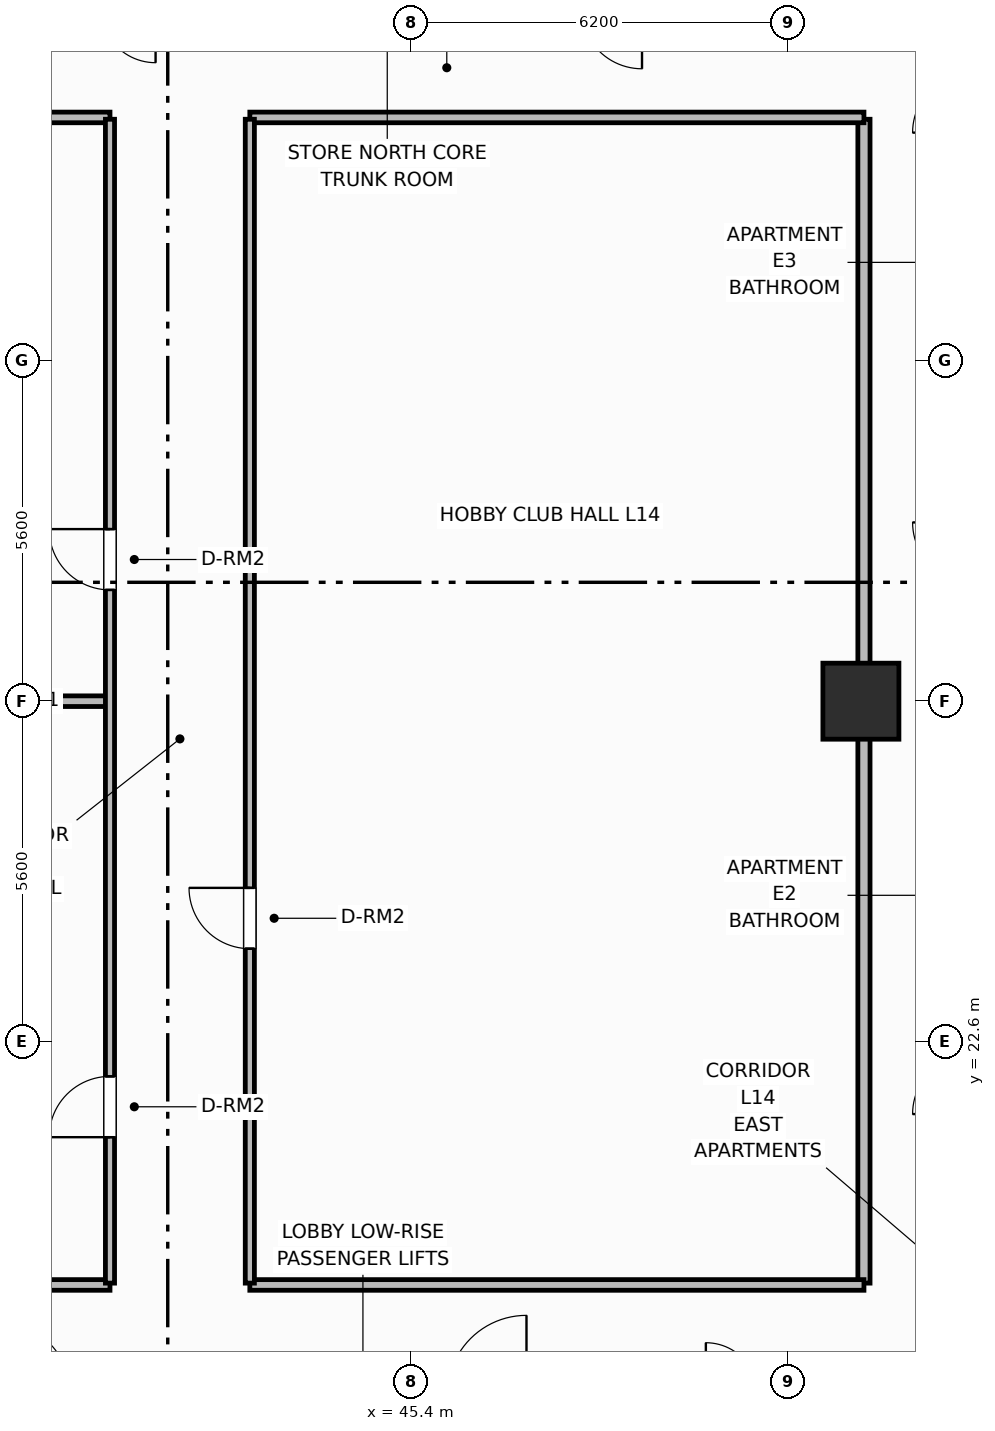
"""IFC4 building model, lengths in metres.
Left out: names, types, materials, properties, quantities, classifications, styles, units other than length and angle.
Written with IfcOpenShell. Run it as: python <this file> out.ifc"""

import sys

from ifc_helpers import new_model, si_unit, direction, frame, frame_2d, origin, origin_2d, place, context, subcontext, project, spatial, rectangle, extrude, element, fill, save


model = new_model("IFC4")
c1 = context("Model", 3, precision=1e-05, world=origin(), true_north=direction((0.0, 1.0)))
c2 = subcontext(c1, "Body", "Model", "MODEL_VIEW")
j1 = project(units=[si_unit("LENGTHUNIT", "METRE"), si_unit("PLANEANGLEUNIT", "RADIAN")], contexts=[c1])
p1 = place(None, origin())
s1 = spatial("IfcSite", under=j1, at=p1, CompositionType="ELEMENT")
p2 = place(p1, origin())
s2 = spatial("IfcBuilding", under=s1, at=p2, CompositionType="ELEMENT")
p3 = place(p2, frame((0.0, 0.0, 58.4)))
s3 = spatial("IfcBuildingStorey", under=s2, at=p3, CompositionType="ELEMENT", Elevation=58.4)
p4 = place(p3, frame((52.8, 28.2, 0.0), z_axis=(0.0, 0.0, 1.0), x_axis=(1.0, 0.0, 0.0)))
e1 = element("IfcColumn", 1, at=p4, inside=s3, PredefinedType="COLUMN", context=c2, shape_type="SweptSolid", body=[
    extrude(rectangle(XDim=1.25, YDim=1.25, at=origin_2d()), origin(), (0.0, 0.0, 1.0), 3.7),
])
p5 = place(p3, frame((52.85, 18.63, 0.0), z_axis=(0.0, 0.0, 1.0), x_axis=(0.0, 1.0, 0.0)))
e2 = element("IfcWall", 2, at=p5, inside=s3, PredefinedType="PARTITIONING", context=c2, shape_type="SweptSolid", body=[
    extrude(rectangle(XDim=19.14, YDim=0.2, at=frame_2d((9.57, 0.0))), origin(), (0.0, 0.0, 1.0), 2.53),
])
p6 = place(p3, frame((25.55, 18.6, 0.0), z_axis=(0.0, 0.0, 1.0), x_axis=(1.0, 0.0, 0.0)))
e3 = element("IfcWall", 3, at=p6, inside=s3, PredefinedType="PARTITIONING", context=c2, shape_type="SweptSolid", body=[
    extrude(rectangle(XDim=14.9, YDim=0.175, at=frame_2d((7.45, 0.0))), origin(), (0.0, 0.0, 1.0), 2.53),
])
p7 = place(p3, frame((42.75, 18.6, 0.0), z_axis=(0.0, 0.0, 1.0), x_axis=(1.0, 0.0, 0.0)))
e4 = element("IfcWall", 4, at=p7, inside=s3, PredefinedType="PARTITIONING", context=c2, shape_type="SweptSolid", body=[
    extrude(rectangle(XDim=10.1, YDim=0.175, at=frame_2d((5.05, 0.0))), origin(), (0.0, 0.0, 1.0), 2.53),
])
p8 = place(p3, frame((25.55, 37.8, 0.0), z_axis=(0.0, 0.0, 1.0), x_axis=(1.0, 0.0, 0.0)))
e5 = element("IfcWall", 5, at=p8, inside=s3, PredefinedType="PARTITIONING", context=c2, shape_type="SweptSolid", body=[
    extrude(rectangle(XDim=14.9, YDim=0.175, at=frame_2d((7.45, 0.0))), origin(), (0.0, 0.0, 1.0), 2.53),
])
p9 = place(p3, frame((42.75, 37.8, 0.0), z_axis=(0.0, 0.0, 1.0), x_axis=(1.0, 0.0, 0.0)))
e6 = element("IfcWall", 6, at=p9, inside=s3, PredefinedType="PARTITIONING", context=c2, shape_type="SweptSolid", body=[
    extrude(rectangle(XDim=10.1, YDim=0.175, at=frame_2d((5.05, 0.0))), origin(), (0.0, 0.0, 1.0), 2.53),
])
p10 = place(p3, frame((25.6, 28.2, 0.0), z_axis=(0.0, 0.0, 1.0), x_axis=(1.0, 0.0, 0.0)))
e7 = element("IfcWall", 7, at=p10, inside=s3, PredefinedType="PARTITIONING", context=c2, shape_type="SweptSolid", body=[
    extrude(rectangle(XDim=14.87, YDim=0.175, at=frame_2d((7.435, 0.0))), origin(), (0.0, 0.0, 1.0), 2.53),
])
p11 = place(p3, frame((40.45, 18.63, 0.0), z_axis=(0.0, 0.0, 1.0), x_axis=(0.0, 1.0, 0.0)))
e8 = element("IfcWall", 8, at=p11, inside=s3, PredefinedType="PARTITIONING", context=c2, shape_type="SweptSolid", body=[
    extrude(rectangle(XDim=19.14, YDim=0.15, at=frame_2d((9.57, 0.0))), origin(), (0.0, 0.0, 1.0), 2.53),
])
p12 = place(p11, frame((2.4, 0.0, 0.0)))
e9 = element("IfcOpeningElement", 9, at=p12, cuts=e8, PredefinedType="OPENING", context=c2, shape_type="SweptSolid", body=[
    extrude(rectangle(XDim=1.0, YDim=2.15, at=frame_2d((0.5, 1.075))), frame((0.0, 0.085, 0.0), z_axis=(0.0, -1.0, 0.0), x_axis=(1.0, 0.0, 0.0)), (0.0, 0.0, 1.0), 0.17),
])
p13 = place(p11, frame((11.4, 0.0, 0.0)))
e10 = element("IfcOpeningElement", 10, at=p13, cuts=e8, PredefinedType="OPENING", context=c2, shape_type="SweptSolid", body=[
    extrude(rectangle(XDim=1.0, YDim=2.15, at=frame_2d((0.5, 1.075))), frame((0.0, 0.085, 0.0), z_axis=(0.0, -1.0, 0.0), x_axis=(1.0, 0.0, 0.0)), (0.0, 0.0, 1.0), 0.17),
])
p14 = place(p3, frame((42.75, 18.63, 0.0), z_axis=(0.0, 0.0, 1.0), x_axis=(0.0, 1.0, 0.0)))
e11 = element("IfcWall", 11, at=p14, inside=s3, PredefinedType="PARTITIONING", context=c2, shape_type="SweptSolid", body=[
    extrude(rectangle(XDim=19.14, YDim=0.15, at=frame_2d((9.57, 0.0))), origin(), (0.0, 0.0, 1.0), 2.53),
])
p15 = place(p14, frame((5.5, 0.0, 0.0)))
e12 = element("IfcOpeningElement", 12, at=p15, cuts=e11, PredefinedType="OPENING", context=c2, shape_type="SweptSolid", body=[
    extrude(rectangle(XDim=1.0, YDim=2.15, at=frame_2d((0.5, 1.075))), frame((0.0, 0.085, 0.0), z_axis=(0.0, -1.0, 0.0), x_axis=(1.0, 0.0, 0.0)), (0.0, 0.0, 1.0), 0.17),
])
p16 = place(p12, origin())
e13 = element("IfcDoor", 13, at=p16, inside=s3, OperationType="SINGLE_SWING_LEFT", PredefinedType="DOOR", context=c2, shape_type="SweptSolid", body=[
    extrude(rectangle(XDim=1.0, YDim=2.15, at=frame_2d((0.5, 1.075))), frame((0.0, 0.025, 0.0), z_axis=(0.0, -1.0, 0.0), x_axis=(1.0, 0.0, 0.0)), (0.0, 0.0, 1.0), 0.05),
])
fill(e9, e13)
p17 = place(p13, origin())
e14 = element("IfcDoor", 14, at=p17, inside=s3, OperationType="SINGLE_SWING_RIGHT", PredefinedType="DOOR", context=c2, shape_type="SweptSolid", body=[
    extrude(rectangle(XDim=1.0, YDim=2.15, at=frame_2d((0.5, 1.075))), frame((0.0, 0.025, 0.0), z_axis=(0.0, -1.0, 0.0), x_axis=(1.0, 0.0, 0.0)), (0.0, 0.0, 1.0), 0.05),
])
fill(e10, e14)
p18 = place(p15, origin())
e15 = element("IfcDoor", 15, at=p18, inside=s3, OperationType="SINGLE_SWING_RIGHT", PredefinedType="DOOR", context=c2, shape_type="SweptSolid", body=[
    extrude(rectangle(XDim=1.0, YDim=2.15, at=frame_2d((0.5, 1.075))), frame((0.0, 0.025, 0.0), z_axis=(0.0, -1.0, 0.0), x_axis=(1.0, 0.0, 0.0)), (0.0, 0.0, 1.0), 0.05),
])
fill(e12, e15)
save(model, sys.argv[1])
